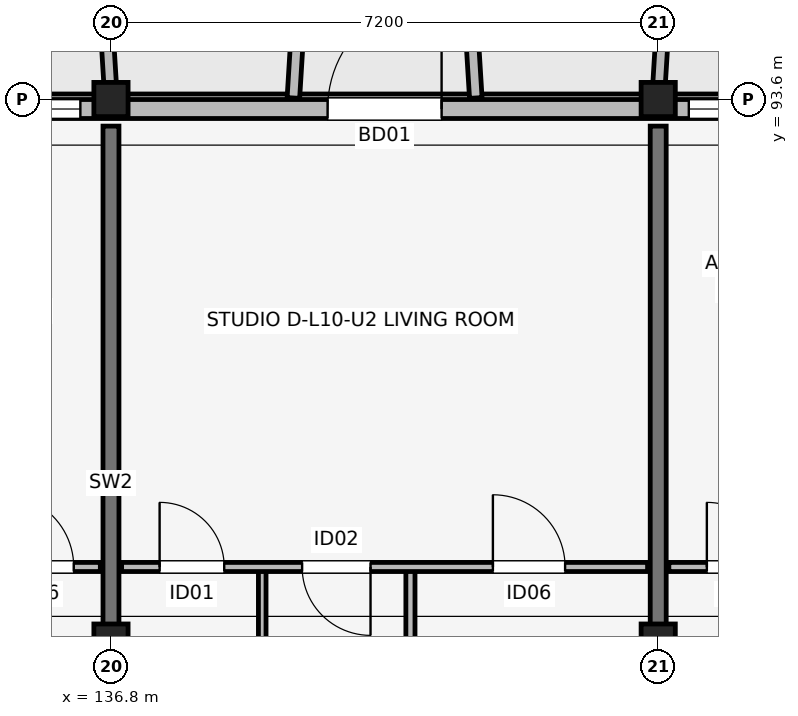
"""IFC4 building model, lengths in metres.
Left out: names, types, materials, properties, quantities, classifications, styles, units other than length and angle.
Written with IfcOpenShell. Run it as: python <this file> out.ifc"""

import sys

from ifc_helpers import new_model, si_unit, direction, frame, frame_2d, origin, origin_2d, place, context, subcontext, project, spatial, rectangle, extrude, element, fill, save


model = new_model("IFC4")
c1 = context("Model", 3, precision=1e-05, world=origin(), true_north=direction((0.0, 1.0)))
c2 = subcontext(c1, "Body", "Model", "MODEL_VIEW")
j1 = project(units=[si_unit("LENGTHUNIT", "METRE"), si_unit("PLANEANGLEUNIT", "RADIAN")], contexts=[c1])
p1 = place(None, origin())
s1 = spatial("IfcSite", under=j1, at=p1, CompositionType="ELEMENT")
p2 = place(p1, origin())
s2 = spatial("IfcBuilding", under=s1, at=p2, CompositionType="ELEMENT")
p3 = place(p2, frame((0.0, 0.0, 33.9)))
s3 = spatial("IfcBuildingStorey", under=s2, at=p3, CompositionType="ELEMENT", Elevation=33.9)
p4 = place(p3, frame((136.8, 86.4, 0.0), z_axis=(0.0, 0.0, 1.0), x_axis=(1.0, 0.0, 0.0)))
e1 = element("IfcColumn", 1, at=p4, inside=s3, PredefinedType="COLUMN", context=c2, shape_type="SweptSolid", body=[
    extrude(rectangle(XDim=0.45, YDim=0.6, at=origin_2d()), origin(), (0.0, 0.0, 1.0), 3.15),
])
p5 = place(p3, frame((136.8, 93.6, 0.0), z_axis=(0.0, 0.0, 1.0), x_axis=(1.0, 0.0, 0.0)))
e2 = element("IfcColumn", 2, at=p5, inside=s3, PredefinedType="COLUMN", context=c2, shape_type="SweptSolid", body=[
    extrude(rectangle(XDim=0.45, YDim=0.45, at=origin_2d()), origin(), (0.0, 0.0, 1.0), 3.15),
])
p6 = place(p3, frame((144.0, 86.4, 0.0), z_axis=(0.0, 0.0, 1.0), x_axis=(1.0, 0.0, 0.0)))
e3 = element("IfcColumn", 3, at=p6, inside=s3, PredefinedType="COLUMN", context=c2, shape_type="SweptSolid", body=[
    extrude(rectangle(XDim=0.45, YDim=0.6, at=origin_2d()), origin(), (0.0, 0.0, 1.0), 3.15),
])
p7 = place(p3, frame((144.0, 93.6, 0.0), z_axis=(0.0, 0.0, 1.0), x_axis=(1.0, 0.0, 0.0)))
e4 = element("IfcColumn", 4, at=p7, inside=s3, PredefinedType="COLUMN", context=c2, shape_type="SweptSolid", body=[
    extrude(rectangle(XDim=0.45, YDim=0.45, at=origin_2d()), origin(), (0.0, 0.0, 1.0), 3.15),
])
for number, where, z_axis, x_axis in (
    (5, (136.8, 83.85, 0.0), (0.0, 0.0, 1.0), (0.0, 1.0, 0.0)),
    (6, (144.0, 83.85, 0.0), (0.0, 0.0, 1.0), (0.0, 1.0, 0.0)),
):
    element("IfcWall", number, at=place(p3, frame(where, z_axis=z_axis, x_axis=x_axis)), inside=s3, PredefinedType="SHEAR", context=c2, shape_type="SweptSolid", body=[
        extrude(rectangle(XDim=9.4, YDim=0.21, at=frame_2d((4.7, 0.0))), origin(), (0.0, 0.0, 1.0), 3.15),
    ])
p8 = place(p3, frame((162.8, 93.475, 0.0), z_axis=(0.0, 0.0, 1.0), x_axis=(-1.0, 0.0, 0.0)))
e7 = element("IfcWall", 7, at=p8, inside=s3, PredefinedType="SOLIDWALL", context=c2, shape_type="SweptSolid", body=[
    extrude(rectangle(XDim=30.4, YDim=0.25, at=frame_2d((15.2, 0.0))), origin(), (0.0, 0.0, 1.0), 2.45),
])
p9 = place(p8, frame((23.15, 0.0, 0.0), z_axis=(0.0, 0.0, 1.0), x_axis=(-1.0, 0.0, 0.0)))
e8 = element("IfcOpeningElement", 8, at=p9, cuts=e7, PredefinedType="OPENING", context=c2, shape_type="SweptSolid", body=[
    extrude(rectangle(XDim=1.5, YDim=2.15, at=frame_2d((0.75, 1.075))), frame((0.0, 0.135, 0.0), z_axis=(0.0, -1.0, 0.0), x_axis=(1.0, 0.0, 0.0)), (0.0, 0.0, 1.0), 0.27),
])
p10 = place(p8, frame((8.9, 0.0, 0.0), z_axis=(0.0, 0.0, 1.0), x_axis=(-1.0, 0.0, 0.0)))
e9 = element("IfcOpeningElement", 9, at=p10, cuts=e7, PredefinedType="OPENING", context=c2, shape_type="SweptSolid", body=[
    extrude(rectangle(XDim=1.8, YDim=2.15, at=frame_2d((0.9, 1.075))), frame((0.0, 0.135, 0.0), z_axis=(0.0, -1.0, 0.0), x_axis=(1.0, 0.0, 0.0)), (0.0, 0.0, 1.0), 0.27),
])
p11 = place(p8, frame((26.403, 0.0, 0.7)))
e10 = element("IfcOpeningElement", 10, at=p11, cuts=e7, PredefinedType="OPENING", context=c2, shape_type="SweptSolid", body=[
    extrude(rectangle(XDim=1.86, YDim=1.6, at=frame_2d((0.93, 0.8))), frame((0.0, 0.135, 0.0), z_axis=(0.0, -1.0, 0.0), x_axis=(1.0, 0.0, 0.0)), (0.0, 0.0, 1.0), 0.27),
])
p12 = place(p8, frame((16.538, 0.0, 0.7)))
e11 = element("IfcOpeningElement", 11, at=p12, cuts=e7, PredefinedType="OPENING", context=c2, shape_type="SweptSolid", body=[
    extrude(rectangle(XDim=1.86, YDim=1.6, at=frame_2d((0.93, 0.8))), frame((0.0, 0.135, 0.0), z_axis=(0.0, -1.0, 0.0), x_axis=(1.0, 0.0, 0.0)), (0.0, 0.0, 1.0), 0.27),
])
p13 = place(p8, frame((12.262, 0.0, 0.75)))
e12 = element("IfcOpeningElement", 12, at=p13, cuts=e7, PredefinedType="OPENING", context=c2, shape_type="SweptSolid", body=[
    extrude(rectangle(XDim=1.34, YDim=1.55, at=frame_2d((0.67, 0.775))), frame((0.0, 0.135, 0.0), z_axis=(0.0, -1.0, 0.0), x_axis=(1.0, 0.0, 0.0)), (0.0, 0.0, 1.0), 0.27),
])
p14 = place(p8, frame((9.748, 0.0, 0.75)))
e13 = element("IfcOpeningElement", 13, at=p14, cuts=e7, PredefinedType="OPENING", context=c2, shape_type="SweptSolid", body=[
    extrude(rectangle(XDim=1.46, YDim=1.55, at=frame_2d((0.73, 0.775))), frame((0.0, 0.135, 0.0), z_axis=(0.0, -1.0, 0.0), x_axis=(1.0, 0.0, 0.0)), (0.0, 0.0, 1.0), 0.27),
])
p15 = place(p8, frame((2.978, 0.0, 0.75)))
e14 = element("IfcOpeningElement", 14, at=p15, cuts=e7, PredefinedType="OPENING", context=c2, shape_type="SweptSolid", body=[
    extrude(rectangle(XDim=0.6, YDim=1.25, at=frame_2d((0.3, 0.625))), frame((0.0, 0.135, 0.0), z_axis=(0.0, -1.0, 0.0), x_axis=(1.0, 0.0, 0.0)), (0.0, 0.0, 1.0), 0.27),
])
p16 = place(p8, frame((0.725, 0.0, 0.75)))
e15 = element("IfcOpeningElement", 15, at=p16, cuts=e7, PredefinedType="OPENING", context=c2, shape_type="SweptSolid", body=[
    extrude(rectangle(XDim=0.72, YDim=1.35, at=frame_2d((0.36, 0.675))), frame((0.0, 0.135, 0.0), z_axis=(0.0, -1.0, 0.0), x_axis=(1.0, 0.0, 0.0)), (0.0, 0.0, 1.0), 0.27),
])
p17 = place(p3, frame((136.8, 93.62, 0.0), z_axis=(0.0, 0.0, 1.0), x_axis=(-0.061170732449, 0.998127317276, 0.0)))
e16 = element("IfcWall", 16, at=p17, inside=s3, PredefinedType="ELEMENTEDWALL", context=c2, shape_type="SweptSolid", body=[
    extrude(rectangle(XDim=1.964, YDim=0.165, at=frame_2d((0.982, 0.0))), origin(), (0.0, 0.0, 1.0), 2.95),
])
for number, where, z_axis, x_axis in (
    (17, (139.2, 93.62, 0.0), (0.0, 0.0, 1.0), (0.061, 0.998, 0.0)),
    (18, (141.6, 93.62, 0.0), (0.0, 0.0, 1.0), (-0.061, 0.998, 0.0)),
):
    element("IfcWall", number, at=place(p3, frame(where, z_axis=z_axis, x_axis=x_axis)), inside=s3, PredefinedType="ELEMENTEDWALL", context=c2, shape_type="SweptSolid", body=[
        extrude(rectangle(XDim=1.964, YDim=0.165, at=frame_2d((0.982, 0.0))), origin(), (0.0, 0.0, 1.0), 2.53),
    ])
p18 = place(p3, frame((144.0, 93.62, 0.0), z_axis=(0.0, 0.0, 1.0), x_axis=(0.061170732449, 0.998127317276, 0.0)))
e19 = element("IfcWall", 19, at=p18, inside=s3, PredefinedType="ELEMENTEDWALL", context=c2, shape_type="SweptSolid", body=[
    extrude(rectangle(XDim=1.964, YDim=0.165, at=frame_2d((0.982, 0.0))), origin(), (0.0, 0.0, 1.0), 2.58),
])
p19 = place(p3, frame((129.74, 87.45, 0.0), z_axis=(0.0, 0.0, 1.0), x_axis=(1.0, 0.0, 0.0)))
e20 = element("IfcWall", 20, at=p19, inside=s3, PredefinedType="PARTITIONING", context=c2, shape_type="SweptSolid", body=[
    extrude(rectangle(XDim=6.92, YDim=0.12, at=frame_2d((3.46, 0.0))), origin(), (0.0, 0.0, 1.0), 2.38),
])
p20 = place(p19, frame((2.24, 0.0, 0.0)))
e21 = element("IfcOpeningElement", 21, at=p20, cuts=e20, PredefinedType="OPENING", context=c2, shape_type="SweptSolid", body=[
    extrude(rectangle(XDim=0.85, YDim=2.08, at=frame_2d((0.425, 1.04))), frame((0.0, 0.07, 0.0), z_axis=(0.0, -1.0, 0.0), x_axis=(1.0, 0.0, 0.0)), (0.0, 0.0, 1.0), 0.14),
])
p21 = place(p19, frame((4.895, 0.0, 0.0), z_axis=(0.0, 0.0, 1.0), x_axis=(-1.0, 0.0, 0.0)))
e22 = element("IfcOpeningElement", 22, at=p21, cuts=e20, PredefinedType="OPENING", context=c2, shape_type="SweptSolid", body=[
    extrude(rectangle(XDim=0.9, YDim=2.08, at=frame_2d((0.45, 1.04))), frame((0.0, 0.07, 0.0), z_axis=(0.0, -1.0, 0.0), x_axis=(1.0, 0.0, 0.0)), (0.0, 0.0, 1.0), 0.14),
])
p22 = place(p19, frame((5.62, 0.0, 0.0)))
e23 = element("IfcOpeningElement", 23, at=p22, cuts=e20, PredefinedType="OPENING", context=c2, shape_type="SweptSolid", body=[
    extrude(rectangle(XDim=0.95, YDim=2.08, at=frame_2d((0.475, 1.04))), frame((0.0, 0.07, 0.0), z_axis=(0.0, -1.0, 0.0), x_axis=(1.0, 0.0, 0.0)), (0.0, 0.0, 1.0), 0.14),
])
p23 = place(p3, frame((138.79, 83.7, 0.0), z_axis=(0.0, 0.0, 1.0), x_axis=(0.0, 1.0, 0.0)))
e24 = element("IfcWall", 24, at=p23, inside=s3, PredefinedType="PARTITIONING", context=c2, shape_type="SweptSolid", body=[
    extrude(rectangle(XDim=3.75, YDim=0.1, at=frame_2d((1.875, 0.0))), origin(), (0.0, 0.0, 1.0), 2.38),
])
p24 = place(p3, frame((140.74, 83.7, 0.0), z_axis=(0.0, 0.0, 1.0), x_axis=(0.0, 1.0, 0.0)))
e25 = element("IfcWall", 25, at=p24, inside=s3, PredefinedType="PARTITIONING", context=c2, shape_type="SweptSolid", body=[
    extrude(rectangle(XDim=3.75, YDim=0.12, at=frame_2d((1.875, 0.0))), origin(), (0.0, 0.0, 1.0), 2.38),
])
p25 = place(p3, frame((136.94, 87.45, 0.0), z_axis=(0.0, 0.0, 1.0), x_axis=(1.0, 0.0, 0.0)))
e26 = element("IfcWall", 26, at=p25, inside=s3, PredefinedType="PARTITIONING", context=c2, shape_type="SweptSolid", body=[
    extrude(rectangle(XDim=6.92, YDim=0.12, at=frame_2d((3.46, 0.0))), origin(), (0.0, 0.0, 1.0), 2.38),
])
p26 = place(p25, frame((0.5, 0.0, 0.0)))
e27 = element("IfcOpeningElement", 27, at=p26, cuts=e26, PredefinedType="OPENING", context=c2, shape_type="SweptSolid", body=[
    extrude(rectangle(XDim=0.85, YDim=2.08, at=frame_2d((0.425, 1.04))), frame((0.0, 0.07, 0.0), z_axis=(0.0, -1.0, 0.0), x_axis=(1.0, 0.0, 0.0)), (0.0, 0.0, 1.0), 0.14),
])
p27 = place(p25, frame((3.275, 0.0, 0.0), z_axis=(0.0, 0.0, 1.0), x_axis=(-1.0, 0.0, 0.0)))
e28 = element("IfcOpeningElement", 28, at=p27, cuts=e26, PredefinedType="OPENING", context=c2, shape_type="SweptSolid", body=[
    extrude(rectangle(XDim=0.9, YDim=2.08, at=frame_2d((0.45, 1.04))), frame((0.0, 0.07, 0.0), z_axis=(0.0, -1.0, 0.0), x_axis=(1.0, 0.0, 0.0)), (0.0, 0.0, 1.0), 0.14),
])
p28 = place(p25, frame((4.885, 0.0, 0.0)))
e29 = element("IfcOpeningElement", 29, at=p28, cuts=e26, PredefinedType="OPENING", context=c2, shape_type="SweptSolid", body=[
    extrude(rectangle(XDim=0.95, YDim=2.08, at=frame_2d((0.475, 1.04))), frame((0.0, 0.07, 0.0), z_axis=(0.0, -1.0, 0.0), x_axis=(1.0, 0.0, 0.0)), (0.0, 0.0, 1.0), 0.14),
])
p29 = place(p3, frame((144.14, 87.45, 0.0), z_axis=(0.0, 0.0, 1.0), x_axis=(1.0, 0.0, 0.0)))
e30 = element("IfcWall", 30, at=p29, inside=s3, PredefinedType="PARTITIONING", context=c2, shape_type="SweptSolid", body=[
    extrude(rectangle(XDim=6.92, YDim=0.12, at=frame_2d((3.46, 0.0))), origin(), (0.0, 0.0, 1.0), 2.38),
])
p30 = place(p29, frame((0.5, 0.0, 0.0)))
e31 = element("IfcOpeningElement", 31, at=p30, cuts=e30, PredefinedType="OPENING", context=c2, shape_type="SweptSolid", body=[
    extrude(rectangle(XDim=0.85, YDim=2.08, at=frame_2d((0.425, 1.04))), frame((0.0, 0.07, 0.0), z_axis=(0.0, -1.0, 0.0), x_axis=(1.0, 0.0, 0.0)), (0.0, 0.0, 1.0), 0.14),
])
p31 = place(p29, frame((3.425, 0.0, 0.0), z_axis=(0.0, 0.0, 1.0), x_axis=(-1.0, 0.0, 0.0)))
e32 = element("IfcOpeningElement", 32, at=p31, cuts=e30, PredefinedType="OPENING", context=c2, shape_type="SweptSolid", body=[
    extrude(rectangle(XDim=0.9, YDim=2.08, at=frame_2d((0.45, 1.04))), frame((0.0, 0.07, 0.0), z_axis=(0.0, -1.0, 0.0), x_axis=(1.0, 0.0, 0.0)), (0.0, 0.0, 1.0), 0.14),
])
p32 = place(p29, frame((5.035, 0.0, 0.0)))
e33 = element("IfcOpeningElement", 33, at=p32, cuts=e30, PredefinedType="OPENING", context=c2, shape_type="SweptSolid", body=[
    extrude(rectangle(XDim=0.95, YDim=2.08, at=frame_2d((0.475, 1.04))), frame((0.0, 0.07, 0.0), z_axis=(0.0, -1.0, 0.0), x_axis=(1.0, 0.0, 0.0)), (0.0, 0.0, 1.0), 0.14),
])
p33 = place(p9, origin())
e34 = element("IfcDoor", 34, at=p33, inside=s3, OperationType="SINGLE_SWING_LEFT", PredefinedType="DOOR", context=c2, shape_type="SweptSolid", body=[
    extrude(rectangle(XDim=1.5, YDim=2.15, at=frame_2d((0.75, 1.075))), frame((0.0, 0.025, 0.0), z_axis=(0.0, -1.0, 0.0), x_axis=(1.0, 0.0, 0.0)), (0.0, 0.0, 1.0), 0.05),
])
fill(e8, e34)
p34 = place(p11, origin())
e35 = element("IfcWindow", 35, at=p34, inside=s3, PartitioningType="SINGLE_PANEL", PredefinedType="WINDOW", context=c2, shape_type="SweptSolid", body=[
    extrude(rectangle(XDim=1.86, YDim=1.6, at=frame_2d((0.93, 0.8))), frame((0.0, 0.03, 0.0), z_axis=(0.0, -1.0, 0.0), x_axis=(1.0, 0.0, 0.0)), (0.0, 0.0, 1.0), 0.06),
])
fill(e10, e35)
p35 = place(p12, origin())
e36 = element("IfcWindow", 36, at=p35, inside=s3, PartitioningType="SINGLE_PANEL", PredefinedType="WINDOW", context=c2, shape_type="SweptSolid", body=[
    extrude(rectangle(XDim=1.86, YDim=1.6, at=frame_2d((0.93, 0.8))), frame((0.0, 0.03, 0.0), z_axis=(0.0, -1.0, 0.0), x_axis=(1.0, 0.0, 0.0)), (0.0, 0.0, 1.0), 0.06),
])
fill(e11, e36)
p36 = place(p22, origin())
e37 = element("IfcDoor", 37, at=p36, inside=s3, OperationType="SINGLE_SWING_LEFT", PredefinedType="DOOR", context=c2, shape_type="SweptSolid", body=[
    extrude(rectangle(XDim=0.95, YDim=2.08, at=frame_2d((0.475, 1.04))), frame((0.0, 0.025, 0.0), z_axis=(0.0, -1.0, 0.0), x_axis=(1.0, 0.0, 0.0)), (0.0, 0.0, 1.0), 0.05),
])
fill(e23, e37)
p37 = place(p26, origin())
e38 = element("IfcDoor", 38, at=p37, inside=s3, OperationType="SINGLE_SWING_LEFT", PredefinedType="DOOR", context=c2, shape_type="SweptSolid", body=[
    extrude(rectangle(XDim=0.85, YDim=2.08, at=frame_2d((0.425, 1.04))), frame((0.0, 0.025, 0.0), z_axis=(0.0, -1.0, 0.0), x_axis=(1.0, 0.0, 0.0)), (0.0, 0.0, 1.0), 0.05),
])
fill(e27, e38)
p38 = place(p27, origin())
e39 = element("IfcDoor", 39, at=p38, inside=s3, OperationType="SINGLE_SWING_RIGHT", PredefinedType="DOOR", context=c2, shape_type="SweptSolid", body=[
    extrude(rectangle(XDim=0.9, YDim=2.08, at=frame_2d((0.45, 1.04))), frame((0.0, 0.025, 0.0), z_axis=(0.0, -1.0, 0.0), x_axis=(1.0, 0.0, 0.0)), (0.0, 0.0, 1.0), 0.05),
])
fill(e28, e39)
p39 = place(p28, origin())
e40 = element("IfcDoor", 40, at=p39, inside=s3, OperationType="SINGLE_SWING_LEFT", PredefinedType="DOOR", context=c2, shape_type="SweptSolid", body=[
    extrude(rectangle(XDim=0.95, YDim=2.08, at=frame_2d((0.475, 1.04))), frame((0.0, 0.025, 0.0), z_axis=(0.0, -1.0, 0.0), x_axis=(1.0, 0.0, 0.0)), (0.0, 0.0, 1.0), 0.05),
])
fill(e29, e40)
p40 = place(p30, origin())
e41 = element("IfcDoor", 41, at=p40, inside=s3, OperationType="SINGLE_SWING_LEFT", PredefinedType="DOOR", context=c2, shape_type="SweptSolid", body=[
    extrude(rectangle(XDim=0.85, YDim=2.08, at=frame_2d((0.425, 1.04))), frame((0.0, 0.025, 0.0), z_axis=(0.0, -1.0, 0.0), x_axis=(1.0, 0.0, 0.0)), (0.0, 0.0, 1.0), 0.05),
])
fill(e31, e41)
save(model, sys.argv[1])
